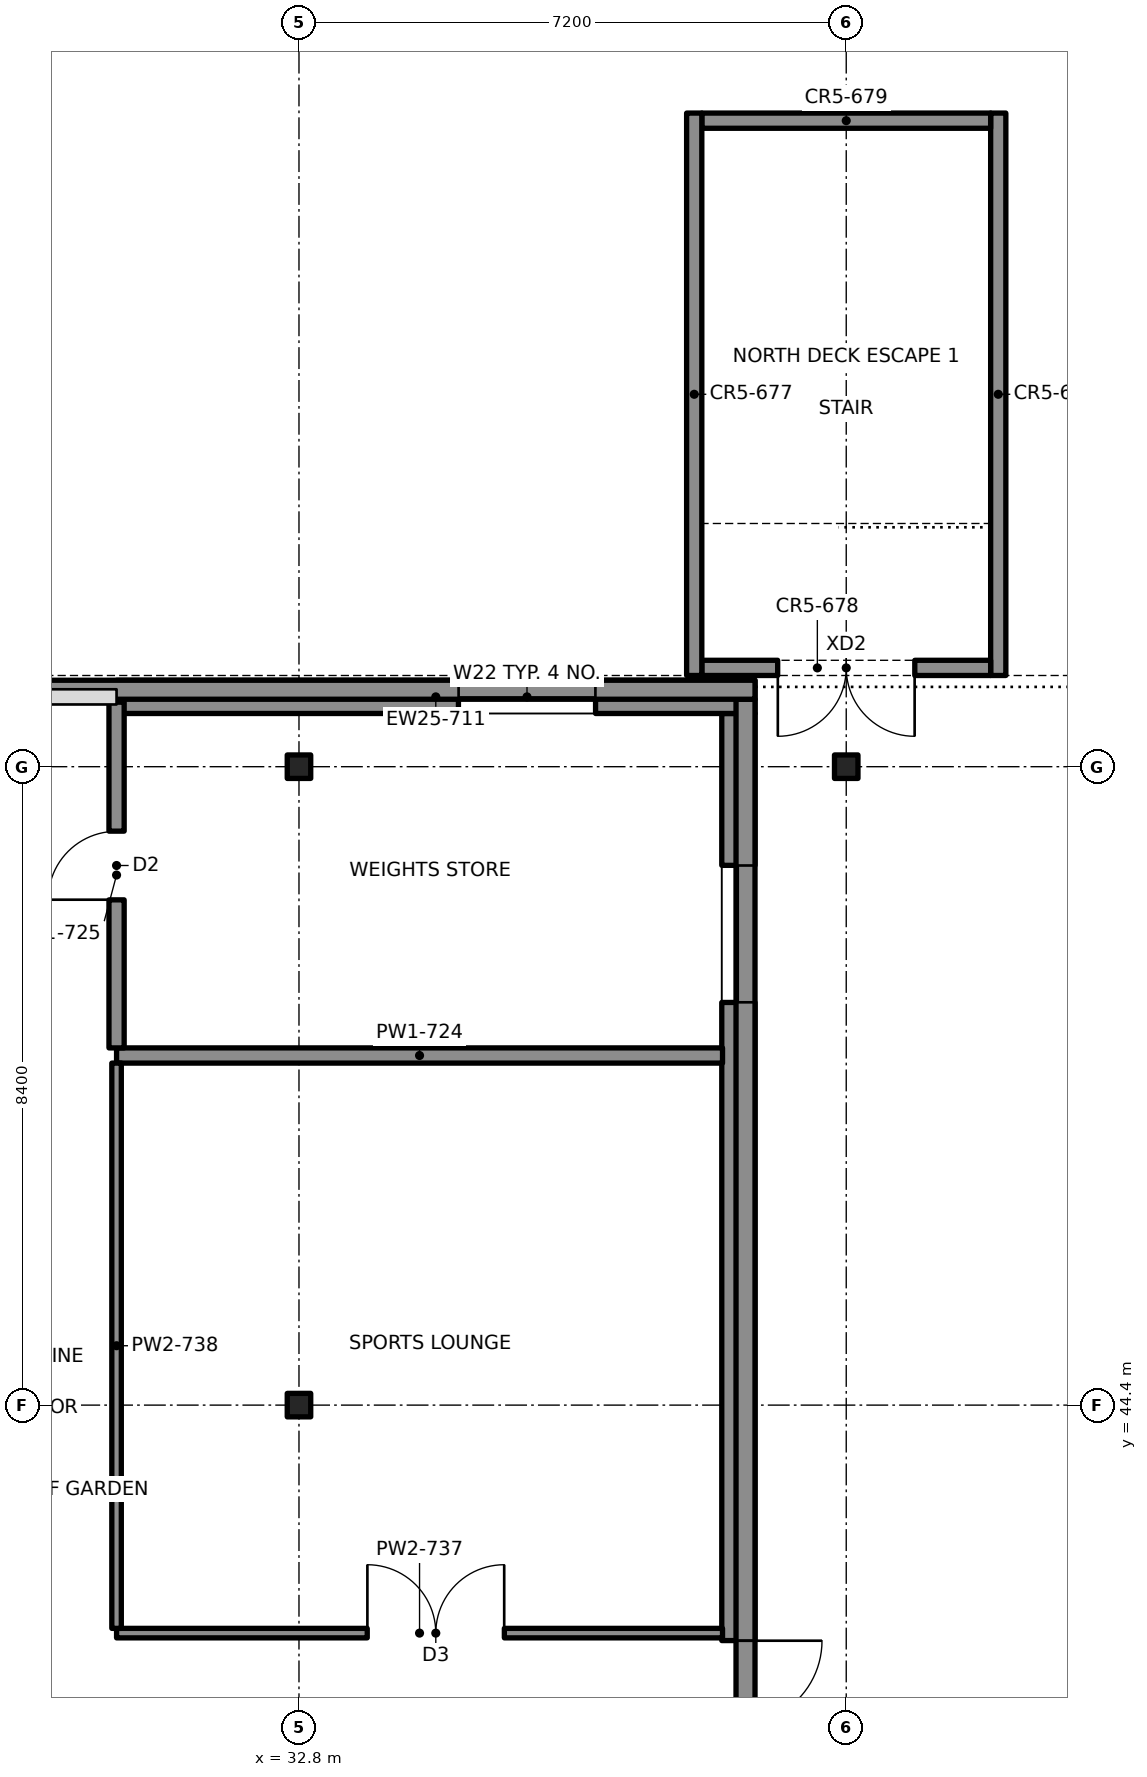
"""IFC4 building model, lengths in metres.
Left out: names, types, materials, properties, quantities, classifications, styles, units other than length and angle.
Written with IfcOpenShell. Run it as: python <this file> out.ifc"""

import sys

from ifc_helpers import new_model, si_unit, direction, frame, frame_2d, origin, origin_2d, place, context, subcontext, project, spatial, rectangle, i_section, extrude, element, fill, save


model = new_model("IFC4")
c1 = context("Model", 3, precision=1e-05, world=origin(), true_north=direction((0.0, 1.0)))
c2 = subcontext(c1, "Body", "Model", "MODEL_VIEW")
j1 = project(units=[si_unit("LENGTHUNIT", "METRE"), si_unit("PLANEANGLEUNIT", "RADIAN")], contexts=[c1])
p1 = place(None, origin())
s1 = spatial("IfcSite", under=j1, at=p1, CompositionType="ELEMENT")
p2 = place(p1, origin())
s2 = spatial("IfcBuilding", under=s1, at=p2, CompositionType="ELEMENT")
p3 = place(p2, frame((0.0, 0.0, 14.0)))
s3 = spatial("IfcBuildingStorey", under=s2, at=p3, CompositionType="ELEMENT", Elevation=14.0)
for number, where, z_axis, x_axis in (
    (1, (32.8, 44.4, 0.0), (0.0, 0.0, 1.0), (1.0, 0.0, 0.0)),
    (2, (32.8, 52.8, 0.0), (0.0, 0.0, 1.0), (1.0, 0.0, 0.0)),
    (3, (40.0, 52.8, 0.0), (0.0, 0.0, 1.0), (1.0, 0.0, 0.0)),
):
    element("IfcColumn", number, at=place(p3, frame(where, z_axis=z_axis, x_axis=x_axis)), inside=s3, PredefinedType="COLUMN", context=c2, shape_type="SweptSolid", body=[
        extrude(i_section(OverallWidth=0.309, OverallDepth=0.323, WebThickness=0.014, FlangeThickness=0.023, at=origin_2d()), origin(), (0.0, 0.0, 1.0), 4.4),
    ])
p4 = place(p3, frame((30.4, 53.719, 0.0), z_axis=(0.0, 0.0, 1.0), x_axis=(1.0, 0.0, 0.0)))
e4 = element("IfcWall", 4, at=p4, inside=s3, PredefinedType="SOLIDWALL", context=c2, shape_type="SweptSolid", body=[
    extrude(rectangle(XDim=8.4, YDim=0.438, at=frame_2d((4.2, 0.0))), origin(), (0.0, 0.0, 1.0), 4.4),
])
p5 = place(p4, frame((4.5, 0.0, 0.75)))
e5 = element("IfcOpeningElement", 5, at=p5, cuts=e4, PredefinedType="OPENING", context=c2, shape_type="SweptSolid", body=[
    extrude(rectangle(XDim=1.8, YDim=2.8, at=frame_2d((0.9, 1.4))), frame((0.0, 0.229, 0.0), z_axis=(0.0, -1.0, 0.0), x_axis=(1.0, 0.0, 0.0)), (0.0, 0.0, 1.0), 0.458),
])
p6 = place(p3, frame((38.581, 18.5, 0.0), z_axis=(0.0, 0.0, 1.0), x_axis=(0.0, 1.0, 0.0)))
e6 = element("IfcWall", 6, at=p6, inside=s3, PredefinedType="SOLIDWALL", context=c2, shape_type="SweptSolid", body=[
    extrude(rectangle(XDim=35.0, YDim=0.438, at=frame_2d((17.5, 0.0))), origin(), (0.0, 0.0, 1.0), 4.4),
])
p7 = place(p6, frame((16.6, 0.0, 0.75)))
e7 = element("IfcOpeningElement", 7, at=p7, cuts=e6, PredefinedType="OPENING", context=c2, shape_type="SweptSolid", body=[
    extrude(rectangle(XDim=1.8, YDim=2.8, at=frame_2d((0.9, 1.4))), frame((0.0, 0.229, 0.0), z_axis=(0.0, -1.0, 0.0), x_axis=(1.0, 0.0, 0.0)), (0.0, 0.0, 1.0), 0.458),
])
p8 = place(p6, frame((4.0, 0.0, 0.75)))
e8 = element("IfcOpeningElement", 8, at=p8, cuts=e6, PredefinedType="OPENING", context=c2, shape_type="SweptSolid", body=[
    extrude(rectangle(XDim=1.8, YDim=2.8, at=frame_2d((0.9, 1.4))), frame((0.0, 0.229, 0.0), z_axis=(0.0, -1.0, 0.0), x_axis=(1.0, 0.0, 0.0)), (0.0, 0.0, 1.0), 0.458),
])
p9 = place(p6, frame((31.2, 0.0, 0.75)))
e9 = element("IfcOpeningElement", 9, at=p9, cuts=e6, PredefinedType="OPENING", context=c2, shape_type="SweptSolid", body=[
    extrude(rectangle(XDim=1.8, YDim=2.8, at=frame_2d((0.9, 1.4))), frame((0.0, 0.229, 0.0), z_axis=(0.0, -1.0, 0.0), x_axis=(1.0, 0.0, 0.0)), (0.0, 0.0, 1.0), 0.458),
])
p10 = place(p6, frame((12.2, 0.0, 0.0)))
e10 = element("IfcOpeningElement", 10, at=p10, cuts=e6, PredefinedType="OPENING", context=c2, shape_type="SweptSolid", body=[
    extrude(rectangle(XDim=2.2, YDim=2.4, at=frame_2d((1.1, 1.2))), frame((0.0, 0.229, 0.0), z_axis=(0.0, -1.0, 0.0), x_axis=(1.0, 0.0, 0.0)), (0.0, 0.0, 1.0), 0.458),
])
p11 = place(p6, frame((20.6, 0.0, 0.0)))
e11 = element("IfcOpeningElement", 11, at=p11, cuts=e6, PredefinedType="OPENING", context=c2, shape_type="SweptSolid", body=[
    extrude(rectangle(XDim=2.2, YDim=2.4, at=frame_2d((1.1, 1.2))), frame((0.0, 0.229, 0.0), z_axis=(0.0, -1.0, 0.0), x_axis=(1.0, 0.0, 0.0)), (0.0, 0.0, 1.0), 0.458),
])
p12 = place(p3, frame((10.062, 53.812, 4.4), z_axis=(0.0, 0.0, 1.0), x_axis=(1.0, 0.0, 0.0)))
e12 = element("IfcWall", 12, at=p12, inside=s3, PredefinedType="PARAPET", context=c2, shape_type="SweptSolid", body=[
    extrude(rectangle(XDim=28.738, YDim=0.25, at=frame_2d((14.369, 0.0))), origin(), (0.0, 0.0, 1.0), 1.1),
])
p13 = place(p3, frame((38.675, 18.312, 4.4), z_axis=(0.0, 0.0, 1.0), x_axis=(0.0, 1.0, 0.0)))
e13 = element("IfcWall", 13, at=p13, inside=s3, PredefinedType="PARAPET", context=c2, shape_type="SweptSolid", body=[
    extrude(rectangle(XDim=35.375, YDim=0.25, at=frame_2d((17.688, 0.0))), origin(), (0.0, 0.0, 1.0), 1.1),
])
for number, where, z_axis, x_axis in (
    (14, (38.0, 54.0, 0.0), (0.0, 0.0, 1.0), (0.0, 1.0, 0.0)),
    (15, (42.0, 61.4, 0.0), (0.0, 0.0, 1.0), (0.0, -1.0, 0.0)),
):
    element("IfcWall", number, at=place(p3, frame(where, z_axis=z_axis, x_axis=x_axis)), inside=s3, PredefinedType="SOLIDWALL", context=c2, shape_type="SweptSolid", body=[
        extrude(rectangle(XDim=7.4, YDim=0.2, at=frame_2d((3.7, 0.0))), origin(), (0.0, 0.0, 1.0), 3.0),
    ])
p14 = place(p3, frame((38.1, 54.1, 0.0), z_axis=(0.0, 0.0, 1.0), x_axis=(1.0, 0.0, 0.0)))
e16 = element("IfcWall", 16, at=p14, inside=s3, PredefinedType="SOLIDWALL", context=c2, shape_type="SweptSolid", body=[
    extrude(rectangle(XDim=3.8, YDim=0.2, at=frame_2d((1.9, 0.0))), origin(), (0.0, 0.0, 1.0), 3.0),
])
p15 = place(p14, frame((1.0, 0.0, 0.0)))
e17 = element("IfcOpeningElement", 17, at=p15, cuts=e16, PredefinedType="OPENING", context=c2, shape_type="SweptSolid", body=[
    extrude(rectangle(XDim=1.8, YDim=2.1, at=frame_2d((0.9, 1.05))), frame((0.0, 0.11, 0.0), z_axis=(0.0, -1.0, 0.0), x_axis=(1.0, 0.0, 0.0)), (0.0, 0.0, 1.0), 0.22),
])
p16 = place(p3, frame((38.1, 61.3, 0.0), z_axis=(0.0, 0.0, 1.0), x_axis=(1.0, 0.0, 0.0)))
e18 = element("IfcWall", 18, at=p16, inside=s3, PredefinedType="SOLIDWALL", context=c2, shape_type="SweptSolid", body=[
    extrude(rectangle(XDim=3.8, YDim=0.2, at=frame_2d((1.9, 0.0))), origin(), (0.0, 0.0, 1.0), 3.0),
])
p17 = place(p3, frame((30.4, 41.4, 0.0), z_axis=(0.0, 0.0, 1.0), x_axis=(1.0, 0.0, 0.0)))
e19 = element("IfcWall", 19, at=p17, inside=s3, PredefinedType="PARTITIONING", context=c2, shape_type="SweptSolid", body=[
    extrude(rectangle(XDim=7.973, YDim=0.125, at=frame_2d((3.986, 0.0))), origin(), (0.0, 0.0, 1.0), 3.65),
])
p18 = place(p17, frame((3.3, 0.0, 0.0)))
e20 = element("IfcOpeningElement", 20, at=p18, cuts=e19, PredefinedType="OPENING", context=c2, shape_type="SweptSolid", body=[
    extrude(rectangle(XDim=1.8, YDim=2.1, at=frame_2d((0.9, 1.05))), frame((0.0, 0.073, 0.0), z_axis=(0.0, -1.0, 0.0), x_axis=(1.0, 0.0, 0.0)), (0.0, 0.0, 1.0), 0.145),
])
p19 = place(p3, frame((30.4, 49.0, 0.0), z_axis=(0.0, 0.0, 1.0), x_axis=(1.0, 0.0, 0.0)))
e21 = element("IfcWall", 21, at=p19, inside=s3, PredefinedType="PARTITIONING", context=c2, shape_type="SweptSolid", body=[
    extrude(rectangle(XDim=7.973, YDim=0.2, at=frame_2d((3.986, 0.0))), origin(), (0.0, 0.0, 1.0), 3.65),
])
p20 = place(p3, frame((30.4, 41.462, 0.0), z_axis=(0.0, 0.0, 1.0), x_axis=(0.0, 1.0, 0.0)))
e22 = element("IfcWall", 22, at=p20, inside=s3, PredefinedType="PARTITIONING", context=c2, shape_type="SweptSolid", body=[
    extrude(rectangle(XDim=7.438, YDim=0.125, at=frame_2d((3.719, 0.0))), origin(), (0.0, 0.0, 1.0), 3.65),
])
p21 = place(p3, frame((30.4, 49.1, 0.0), z_axis=(0.0, 0.0, 1.0), x_axis=(0.0, 1.0, 0.0)))
e23 = element("IfcWall", 23, at=p21, inside=s3, PredefinedType="PARTITIONING", context=c2, shape_type="SweptSolid", body=[
    extrude(rectangle(XDim=4.549, YDim=0.2, at=frame_2d((2.274, 0.0))), origin(), (0.0, 0.0, 1.0), 3.65),
])
p22 = place(p21, frame((1.95, 0.0, 0.0)))
e24 = element("IfcOpeningElement", 24, at=p22, cuts=e23, PredefinedType="OPENING", context=c2, shape_type="SweptSolid", body=[
    extrude(rectangle(XDim=0.9, YDim=2.1, at=frame_2d((0.45, 1.05))), frame((0.0, 0.11, 0.0), z_axis=(0.0, -1.0, 0.0), x_axis=(1.0, 0.0, 0.0)), (0.0, 0.0, 1.0), 0.22),
])
p23 = place(p5, origin())
e25 = element("IfcWindow", 25, at=p23, inside=s3, PartitioningType="SINGLE_PANEL", PredefinedType="WINDOW", context=c2, shape_type="SweptSolid", body=[
    extrude(rectangle(XDim=1.8, YDim=2.8, at=frame_2d((0.9, 1.4))), frame((0.0, 0.03, 0.0), z_axis=(0.0, -1.0, 0.0), x_axis=(1.0, 0.0, 0.0)), (0.0, 0.0, 1.0), 0.06),
])
fill(e5, e25)
p24 = place(p9, origin())
e26 = element("IfcWindow", 26, at=p24, inside=s3, PartitioningType="SINGLE_PANEL", PredefinedType="WINDOW", context=c2, shape_type="SweptSolid", body=[
    extrude(rectangle(XDim=1.8, YDim=2.8, at=frame_2d((0.9, 1.4))), frame((0.0, 0.03, 0.0), z_axis=(0.0, -1.0, 0.0), x_axis=(1.0, 0.0, 0.0)), (0.0, 0.0, 1.0), 0.06),
])
fill(e9, e26)
p25 = place(p11, origin())
e27 = element("IfcDoor", 27, at=p25, inside=s3, OperationType="DOUBLE_DOOR_SINGLE_SWING", PredefinedType="DOOR", context=c2, shape_type="SweptSolid", body=[
    extrude(rectangle(XDim=2.2, YDim=2.4, at=frame_2d((1.1, 1.2))), frame((0.0, 0.025, 0.0), z_axis=(0.0, -1.0, 0.0), x_axis=(1.0, 0.0, 0.0)), (0.0, 0.0, 1.0), 0.05),
])
fill(e11, e27)
p26 = place(p15, origin())
e28 = element("IfcDoor", 28, at=p26, inside=s3, OperationType="DOUBLE_DOOR_SINGLE_SWING", PredefinedType="DOOR", context=c2, shape_type="SweptSolid", body=[
    extrude(rectangle(XDim=1.8, YDim=2.1, at=frame_2d((0.9, 1.05))), frame((0.0, 0.025, 0.0), z_axis=(0.0, -1.0, 0.0), x_axis=(1.0, 0.0, 0.0)), (0.0, 0.0, 1.0), 0.05),
])
fill(e17, e28)
p27 = place(p18, origin())
e29 = element("IfcDoor", 29, at=p27, inside=s3, OperationType="DOUBLE_DOOR_SINGLE_SWING", PredefinedType="DOOR", context=c2, shape_type="SweptSolid", body=[
    extrude(rectangle(XDim=1.8, YDim=2.1, at=frame_2d((0.9, 1.05))), frame((0.0, 0.025, 0.0), z_axis=(0.0, -1.0, 0.0), x_axis=(1.0, 0.0, 0.0)), (0.0, 0.0, 1.0), 0.05),
])
fill(e20, e29)
p28 = place(p22, origin())
e30 = element("IfcDoor", 30, at=p28, inside=s3, OperationType="SINGLE_SWING_LEFT", PredefinedType="DOOR", context=c2, shape_type="SweptSolid", body=[
    extrude(rectangle(XDim=0.9, YDim=2.1, at=frame_2d((0.45, 1.05))), frame((0.0, 0.025, 0.0), z_axis=(0.0, -1.0, 0.0), x_axis=(1.0, 0.0, 0.0)), (0.0, 0.0, 1.0), 0.05),
])
fill(e24, e30)
save(model, sys.argv[1])
